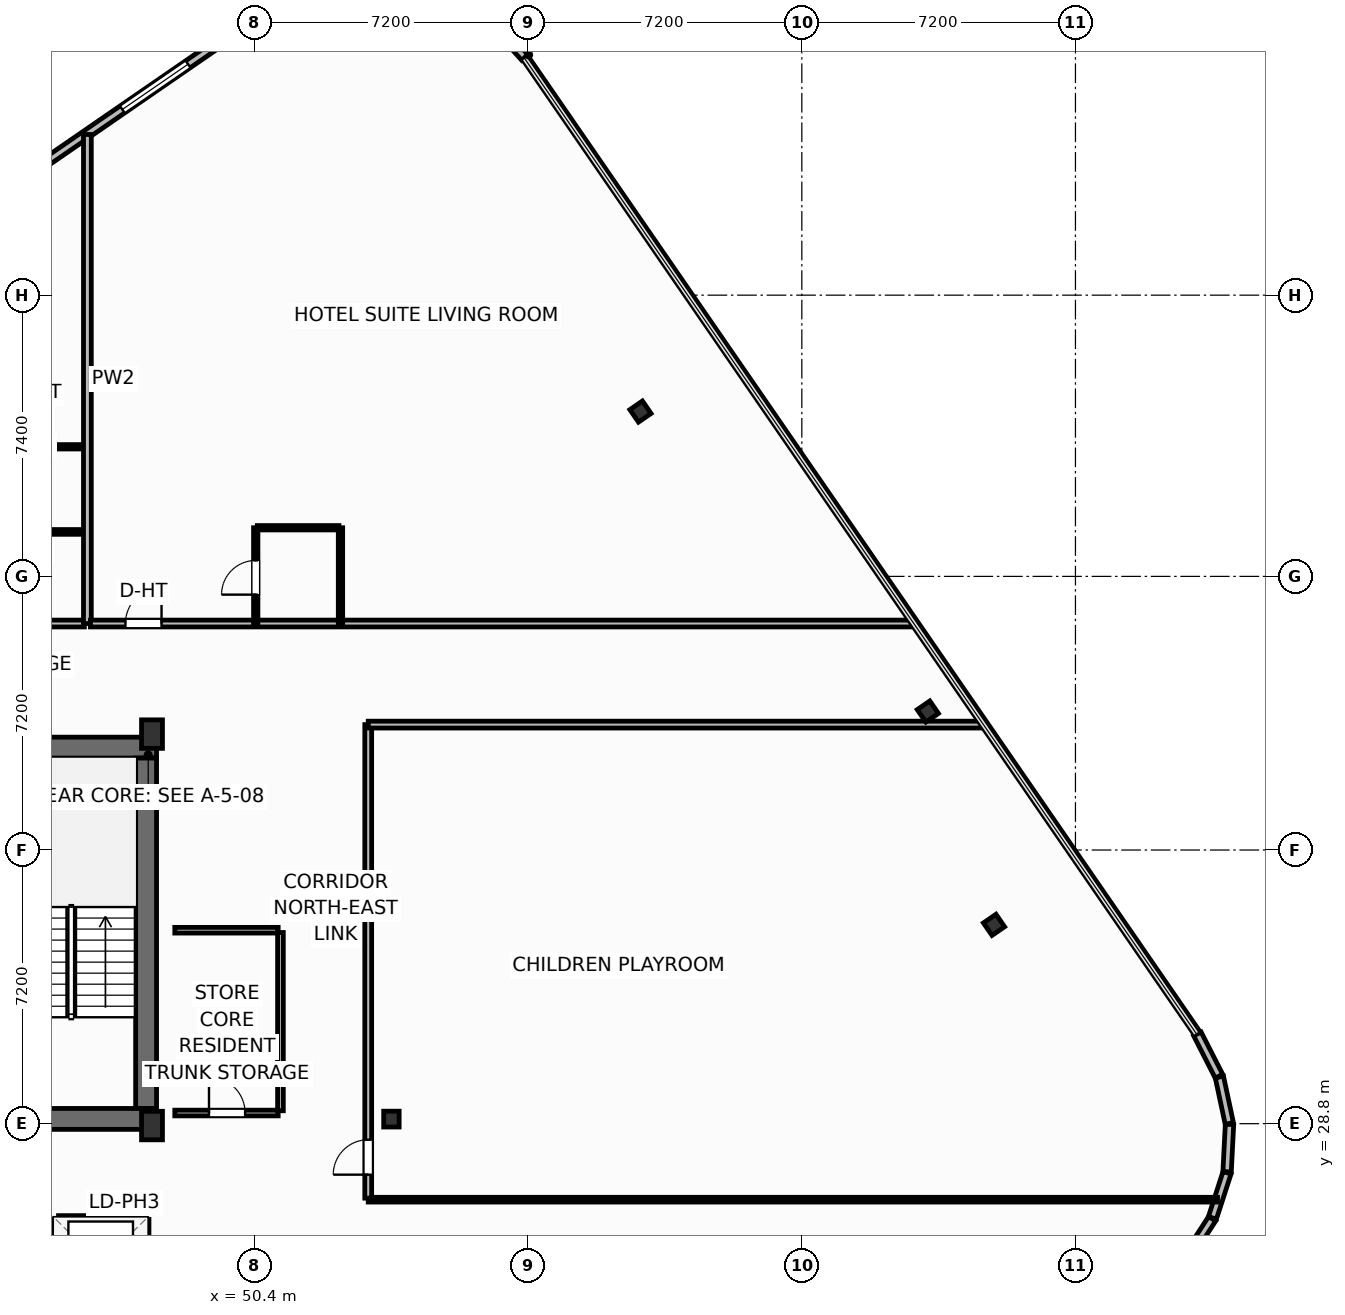
"""IFC4 building model, lengths in metres.
Left out: names, types, materials, properties, quantities, classifications, styles, units other than length and angle.
Written with IfcOpenShell. Run it as: python <this file> out.ifc"""

import sys

from ifc_helpers import new_model, si_unit, direction, frame, frame_2d, origin, origin_2d, place, context, subcontext, project, spatial, rectangle, i_section, extrude, element, fill, save


model = new_model("IFC4")
c1 = context("Model", 3, precision=1e-05, world=origin(), true_north=direction((0.0, 1.0)))
c2 = subcontext(c1, "Body", "Model", "MODEL_VIEW")
j1 = project(units=[si_unit("LENGTHUNIT", "METRE"), si_unit("PLANEANGLEUNIT", "RADIAN")], contexts=[c1])
p1 = place(None, origin())
s1 = spatial("IfcSite", under=j1, at=p1, CompositionType="ELEMENT")
p2 = place(p1, origin())
s2 = spatial("IfcBuilding", under=s1, at=p2, CompositionType="ELEMENT")
p3 = place(p2, frame((0.0, 0.0, 276.7)))
s3 = spatial("IfcBuildingStorey", under=s2, at=p3, CompositionType="ELEMENT", Elevation=276.7)
for number, where, z_axis, x_axis in (
    (1, (47.7, 28.75, 0.0), (0.0, 0.0, 1.0), (1.0, 0.0, 0.0)),
    (2, (47.7, 39.05, 0.0), (0.0, 0.0, 1.0), (1.0, 0.0, 0.0)),
):
    element("IfcColumn", number, at=place(p3, frame(where, z_axis=z_axis, x_axis=x_axis)), inside=s3, PredefinedType="COLUMN", context=c2, shape_type="SweptSolid", body=[
        extrude(rectangle(XDim=0.55, YDim=0.75, at=origin_2d()), origin(), (0.0, 0.0, 1.0), 3.7),
    ])
p4 = place(p3, frame((54.0, 28.92, 0.0), z_axis=(0.0, 0.0, 1.0), x_axis=(1.0, 0.0, 0.0)))
e3 = element("IfcColumn", 3, at=p4, inside=s3, PredefinedType="COLUMN", context=c2, shape_type="SweptSolid", body=[
    extrude(i_section(OverallWidth=0.406, OverallDepth=0.416, WebThickness=0.03, FlangeThickness=0.048, FilletRadius=0.025, at=origin_2d()), origin(), (0.0, 0.0, 1.0), 3.7),
])
p5 = place(p3, frame((30.58, 38.695, 0.0), z_axis=(0.0, 0.0, 1.0), x_axis=(1.0, 0.0, 0.0)))
e4 = element("IfcWall", 4, at=p5, inside=s3, PredefinedType="SHEAR", context=c2, shape_type="SweptSolid", body=[
    extrude(rectangle(XDim=17.24, YDim=0.55, at=frame_2d((8.62, 0.0))), origin(), (0.0, 0.0, 1.0), 3.45),
])
p6 = place(p3, frame((47.545, 29.2, 0.0), z_axis=(0.0, 0.0, 1.0), x_axis=(0.0, 1.0, 0.0)))
e5 = element("IfcWall", 5, at=p6, inside=s3, PredefinedType="SHEAR", context=c2, shape_type="SweptSolid", body=[
    extrude(rectangle(XDim=9.22, YDim=0.55, at=frame_2d((4.61, 0.0))), origin(), (0.0, 0.0, 1.0), 3.45),
])
p7 = place(p3, frame((43.6, 28.925, 0.0), z_axis=(0.0, 0.0, 1.0), x_axis=(1.0, 0.0, 0.0)))
e6 = element("IfcWall", 6, at=p7, inside=s3, PredefinedType="SHEAR", context=c2, shape_type="SweptSolid", body=[
    extrude(rectangle(XDim=4.22, YDim=0.55, at=frame_2d((2.11, 0.0))), origin(), (0.0, 0.0, 1.0), 3.45),
])
for number, where, z_axis, x_axis in (
    (7, (69.857, 34.031, 0.0), (0.0, 0.0, 1.0), (0.824, 0.567, 0.0)),
    (8, (68.115, 39.644, 0.0), (0.0, 0.0, 1.0), (0.824, 0.567, 0.0)),
    (9, (60.554, 47.537, 0.0), (0.0, 0.0, 1.0), (0.824, 0.567, 0.0)),
):
    element("IfcColumn", number, at=place(p3, frame(where, z_axis=z_axis, x_axis=x_axis)), inside=s3, PredefinedType="COLUMN", context=c2, shape_type="SweptSolid", body=[
        extrude(i_section(OverallWidth=0.401, OverallDepth=0.399, WebThickness=0.025, FlangeThickness=0.04, FilletRadius=0.022, at=origin_2d()), origin(), (0.0, 0.0, 1.0), 3.7),
    ])
p8 = place(p3, frame((74.917, 25.25, 0.0), z_axis=(0.0, 0.0, 1.0), x_axis=(0.543778157277, 0.839229000731, 0.0)))
e10 = element("IfcWall", 10, at=p8, inside=s3, PredefinedType="SOLIDWALL", context=c2, shape_type="SweptSolid", body=[
    extrude(rectangle(XDim=1.249, YDim=0.22, at=frame_2d((0.624, 0.0))), origin(), (0.0, 0.0, 1.0), 2.73),
])
for number, where, z_axis, x_axis in (
    (11, (75.604, 26.321, 0.0), (0.0, 0.0, 1.0), (0.308, 0.951, 0.0)),
    (12, (75.99, 27.534, 0.0), (0.0, 0.0, 1.0), (0.051, 0.999, 0.0)),
    (13, (76.049, 28.805, 0.0), (0.0, 0.0, 1.0), (-0.209, 0.978, 0.0)),
    (14, (75.777, 30.049, 0.0), (0.0, 0.0, 1.0), (-0.455, 0.891, 0.0)),
):
    element("IfcWall", number, at=place(p3, frame(where, z_axis=z_axis, x_axis=x_axis)), inside=s3, PredefinedType="SOLIDWALL", context=c2, shape_type="SweptSolid", body=[
        extrude(rectangle(XDim=1.249, YDim=0.22, at=frame_2d((0.625, 0.0))), origin(), (0.0, 0.0, 1.0), 2.73),
    ])
p9 = place(p3, frame((57.51, 56.855, 0.0), z_axis=(0.0, 0.0, 1.0), x_axis=(-0.669853727156, 0.742493086982, 0.0)))
e15 = element("IfcWall", 15, at=p9, inside=s3, PredefinedType="SOLIDWALL", context=c2, shape_type="SweptSolid", body=[
    extrude(rectangle(XDim=1.274, YDim=0.22, at=frame_2d((0.637, 0.0))), origin(), (0.0, 0.0, 1.0), 2.73),
])
p10 = place(p3, frame((50.697, 58.087, 0.0), z_axis=(0.0, 0.0, 1.0), x_axis=(-0.823539455464, -0.567258993137, 0.0)))
e16 = element("IfcWall", 16, at=p10, inside=s3, PredefinedType="SOLIDWALL", context=c2, shape_type="SweptSolid", body=[
    extrude(rectangle(XDim=10.98, YDim=0.22, at=frame_2d((5.49, 0.0))), origin(), (0.0, 0.0, 1.0), 2.73),
])
p11 = place(p10, frame((2.486, 0.0, 0.8)))
e17 = element("IfcOpeningElement", 17, at=p11, cuts=e16, PredefinedType="OPENING", context=c2, shape_type="SweptSolid", body=[
    extrude(rectangle(XDim=2.1, YDim=1.75, at=frame_2d((1.05, 0.875))), frame((0.0, 0.12, 0.0), z_axis=(0.0, -1.0, 0.0), x_axis=(1.0, 0.0, 0.0)), (0.0, 0.0, 1.0), 0.24),
])
p12 = place(p3, frame((33.08, 41.96, 0.0), z_axis=(0.0, 0.0, 1.0), x_axis=(1.0, 0.0, 0.0)))
e18 = element("IfcWall", 18, at=p12, inside=s3, PredefinedType="PARTITIONING", context=c2, shape_type="SweptSolid", body=[
    extrude(rectangle(XDim=12.84, YDim=0.18, at=frame_2d((6.42, 0.0))), origin(), (0.0, 0.0, 1.0), 3.45),
])
p13 = place(p12, frame((3.485, 0.0, 0.0)))
e19 = element("IfcOpeningElement", 19, at=p13, cuts=e18, PredefinedType="OPENING", context=c2, shape_type="SweptSolid", body=[
    extrude(rectangle(XDim=1.0, YDim=2.2, at=frame_2d((0.5, 1.1))), frame((0.0, 0.1, 0.0), z_axis=(0.0, -1.0, 0.0), x_axis=(1.0, 0.0, 0.0)), (0.0, 0.0, 1.0), 0.2),
])
p14 = place(p3, frame((41.19, 44.37, 0.0), z_axis=(0.0, 0.0, 1.0), x_axis=(1.0, 0.0, 0.0)))
e20 = element("IfcWall", 20, at=p14, inside=s3, PredefinedType="PARTITIONING", context=c2, shape_type="SweptSolid", body=[
    extrude(rectangle(XDim=4.73, YDim=0.125, at=frame_2d((2.365, 0.0))), origin(), (0.0, 0.0, 1.0), 3.45),
])
p15 = place(p3, frame((41.19, 46.61, 0.0), z_axis=(0.0, 0.0, 1.0), x_axis=(1.0, 0.0, 0.0)))
e21 = element("IfcWall", 21, at=p15, inside=s3, PredefinedType="PARTITIONING", context=c2, shape_type="SweptSolid", body=[
    extrude(rectangle(XDim=4.73, YDim=0.115, at=frame_2d((2.365, 0.0))), origin(), (0.0, 0.0, 1.0), 3.45),
])
p16 = place(p3, frame((46.0, 41.96, 0.0), z_axis=(0.0, 0.0, 1.0), x_axis=(0.0, 1.0, 0.0)))
e22 = element("IfcWall", 22, at=p16, inside=s3, PredefinedType="PARTITIONING", context=c2, shape_type="SweptSolid", body=[
    extrude(rectangle(XDim=12.868, YDim=0.205, at=frame_2d((6.434, 0.0))), origin(), (0.0, 0.0, 1.0), 3.45),
])
p17 = place(p3, frame((46.08, 41.96, 0.0), z_axis=(0.0, 0.0, 1.0), x_axis=(1.0, 0.0, 0.0)))
e23 = element("IfcWall", 23, at=p17, inside=s3, PredefinedType="PARTITIONING", context=c2, shape_type="SweptSolid", body=[
    extrude(rectangle(XDim=21.627, YDim=0.18, at=frame_2d((10.813, 0.0))), origin(), (0.0, 0.0, 1.0), 3.45),
])
p18 = place(p17, frame((0.921, 0.0, 0.0)))
e24 = element("IfcOpeningElement", 24, at=p18, cuts=e23, PredefinedType="OPENING", context=c2, shape_type="SweptSolid", body=[
    extrude(rectangle(XDim=0.95, YDim=2.15, at=frame_2d((0.475, 1.075))), frame((0.0, 0.1, 0.0), z_axis=(0.0, -1.0, 0.0), x_axis=(1.0, 0.0, 0.0)), (0.0, 0.0, 1.0), 0.2),
])
p19 = place(p3, frame((50.47, 44.48, 0.0), z_axis=(0.0, 0.0, 1.0), x_axis=(1.0, 0.0, 0.0)))
e25 = element("IfcWall", 25, at=p19, inside=s3, PredefinedType="PARTITIONING", context=c2, shape_type="SweptSolid", body=[
    extrude(rectangle(XDim=2.15, YDim=0.115, at=frame_2d((1.075, 0.0))), origin(), (0.0, 0.0, 1.0), 3.45),
])
p20 = place(p3, frame((50.43, 41.96, 0.0), z_axis=(0.0, 0.0, 1.0), x_axis=(0.0, 1.0, 0.0)))
e26 = element("IfcWall", 26, at=p20, inside=s3, PredefinedType="PARTITIONING", context=c2, shape_type="SweptSolid", body=[
    extrude(rectangle(XDim=2.52, YDim=0.115, at=frame_2d((1.26, 0.0))), origin(), (0.0, 0.0, 1.0), 3.45),
])
p21 = place(p20, frame((0.76, 0.0, 0.0)))
e27 = element("IfcOpeningElement", 27, at=p21, cuts=e26, PredefinedType="OPENING", context=c2, shape_type="SweptSolid", body=[
    extrude(rectangle(XDim=0.9, YDim=2.05, at=frame_2d((0.45, 1.025))), frame((0.0, 0.067, 0.0), z_axis=(0.0, -1.0, 0.0), x_axis=(1.0, 0.0, 0.0)), (0.0, 0.0, 1.0), 0.135),
])
p22 = place(p3, frame((52.66, 41.96, 0.0), z_axis=(0.0, 0.0, 1.0), x_axis=(0.0, 1.0, 0.0)))
e28 = element("IfcWall", 28, at=p22, inside=s3, PredefinedType="PARTITIONING", context=c2, shape_type="SweptSolid", body=[
    extrude(rectangle(XDim=2.52, YDim=0.115, at=frame_2d((1.26, 0.0))), origin(), (0.0, 0.0, 1.0), 3.45),
])
p23 = place(p3, frame((53.39, 26.8, 0.0), z_axis=(0.0, 0.0, 1.0), x_axis=(1.0, 0.0, 0.0)))
e29 = element("IfcWall", 29, at=p23, inside=s3, PredefinedType="PARTITIONING", context=c2, shape_type="SweptSolid", body=[
    extrude(rectangle(XDim=22.348, YDim=0.125, at=frame_2d((11.174, 0.0))), origin(), (0.0, 0.0, 1.0), 3.45),
])
p24 = place(p3, frame((53.39, 26.84, 0.0), z_axis=(0.0, 0.0, 1.0), x_axis=(0.0, 1.0, 0.0)))
e30 = element("IfcWall", 30, at=p24, inside=s3, PredefinedType="PARTITIONING", context=c2, shape_type="SweptSolid", body=[
    extrude(rectangle(XDim=12.46, YDim=0.18, at=frame_2d((6.23, 0.0))), origin(), (0.0, 0.0, 1.0), 3.45),
])
p25 = place(p24, frame((0.618, 0.0, 0.0)))
e31 = element("IfcOpeningElement", 31, at=p25, cuts=e30, PredefinedType="OPENING", context=c2, shape_type="SweptSolid", body=[
    extrude(rectangle(XDim=0.92, YDim=2.05, at=frame_2d((0.46, 1.025))), frame((0.0, 0.1, 0.0), z_axis=(0.0, -1.0, 0.0), x_axis=(1.0, 0.0, 0.0)), (0.0, 0.0, 1.0), 0.2),
])
p26 = place(p3, frame((53.39, 39.3, 0.0), z_axis=(0.0, 0.0, 1.0), x_axis=(1.0, 0.0, 0.0)))
e32 = element("IfcWall", 32, at=p26, inside=s3, PredefinedType="PARTITIONING", context=c2, shape_type="SweptSolid", body=[
    extrude(rectangle(XDim=16.149, YDim=0.18, at=frame_2d((8.075, 0.0))), origin(), (0.0, 0.0, 1.0), 2.739),
])
p27 = place(p3, frame((48.3, 29.08, 0.0), z_axis=(0.0, 0.0, 1.0), x_axis=(1.0, 0.0, 0.0)))
e33 = element("IfcWall", 33, at=p27, inside=s3, PredefinedType="PARTITIONING", context=c2, shape_type="SweptSolid", body=[
    extrude(rectangle(XDim=2.72, YDim=0.15, at=frame_2d((1.36, 0.0))), origin(), (0.0, 0.0, 1.0), 2.662),
])
p28 = place(p27, frame((0.9, 0.0, 0.0)))
e34 = element("IfcOpeningElement", 34, at=p28, cuts=e33, PredefinedType="OPENING", context=c2, shape_type="SweptSolid", body=[
    extrude(rectangle(XDim=0.95, YDim=2.05, at=frame_2d((0.475, 1.025))), frame((0.0, 0.085, 0.0), z_axis=(0.0, -1.0, 0.0), x_axis=(1.0, 0.0, 0.0)), (0.0, 0.0, 1.0), 0.17),
])
p29 = place(p3, frame((48.3, 33.89, 0.0), z_axis=(0.0, 0.0, 1.0), x_axis=(1.0, 0.0, 0.0)))
e35 = element("IfcWall", 35, at=p29, inside=s3, PredefinedType="PARTITIONING", context=c2, shape_type="SweptSolid", body=[
    extrude(rectangle(XDim=2.72, YDim=0.15, at=frame_2d((1.36, 0.0))), origin(), (0.0, 0.0, 1.0), 3.45),
])
p30 = place(p3, frame((51.08, 29.14, 0.0), z_axis=(0.0, 0.0, 1.0), x_axis=(0.0, 1.0, 0.0)))
e36 = element("IfcWall", 36, at=p30, inside=s3, PredefinedType="PARTITIONING", context=c2, shape_type="SweptSolid", body=[
    extrude(rectangle(XDim=4.69, YDim=0.15, at=frame_2d((2.345, 0.0))), origin(), (0.0, 0.0, 1.0), 3.45),
])
p31 = place(p3, frame((45.24, 26.28, 0.0), z_axis=(0.0, 0.0, 1.0), x_axis=(1.0, 0.0, 0.0)))
e37 = element("IfcWall", 37, at=p31, inside=s3, PredefinedType="PARTITIONING", context=c2, shape_type="SweptSolid", body=[
    extrude(rectangle(XDim=2.22, YDim=0.2, at=frame_2d((1.11, 0.0))), origin(), (0.0, 0.0, 1.0), 3.45),
])
p32 = place(p3, frame((45.18, 19.38, 0.0), z_axis=(0.0, 0.0, 1.0), x_axis=(0.0, 1.0, 0.0)))
e38 = element("IfcWall", 38, at=p32, inside=s3, PredefinedType="PARTITIONING", context=c2, shape_type="SweptSolid", body=[
    extrude(rectangle(XDim=6.9, YDim=0.2, at=frame_2d((3.45, 0.0))), origin(), (0.0, 0.0, 1.0), 3.45),
])
p33 = place(p3, frame((47.52, 19.38, 0.0), z_axis=(0.0, 0.0, 1.0), x_axis=(0.0, 1.0, 0.0)))
e39 = element("IfcWall", 39, at=p33, inside=s3, PredefinedType="PARTITIONING", context=c2, shape_type="SweptSolid", body=[
    extrude(rectangle(XDim=6.9, YDim=0.2, at=frame_2d((3.45, 0.0))), origin(), (0.0, 0.0, 1.0), 3.45),
])
p34 = place(p33, frame((0.59, 0.0, 0.0)))
e40 = element("IfcOpeningElement", 40, at=p34, cuts=e39, PredefinedType="OPENING", context=c2, shape_type="SweptSolid", body=[
    extrude(rectangle(XDim=1.1, YDim=2.15, at=frame_2d((0.55, 1.075))), frame((0.0, 0.11, 0.0), z_axis=(0.0, -1.0, 0.0), x_axis=(1.0, 0.0, 0.0)), (0.0, 0.0, 1.0), 0.22),
])
p35 = place(p33, frame((2.89, 0.0, 0.0)))
e41 = element("IfcOpeningElement", 41, at=p35, cuts=e39, PredefinedType="OPENING", context=c2, shape_type="SweptSolid", body=[
    extrude(rectangle(XDim=1.1, YDim=2.15, at=frame_2d((0.55, 1.075))), frame((0.0, 0.11, 0.0), z_axis=(0.0, -1.0, 0.0), x_axis=(1.0, 0.0, 0.0)), (0.0, 0.0, 1.0), 0.22),
])
p36 = place(p33, frame((5.19, 0.0, 0.0)))
e42 = element("IfcOpeningElement", 42, at=p36, cuts=e39, PredefinedType="OPENING", context=c2, shape_type="SweptSolid", body=[
    extrude(rectangle(XDim=1.1, YDim=2.15, at=frame_2d((0.55, 1.075))), frame((0.0, 0.11, 0.0), z_axis=(0.0, -1.0, 0.0), x_axis=(1.0, 0.0, 0.0)), (0.0, 0.0, 1.0), 0.22),
])
p37 = place(p11, origin())
e43 = element("IfcWindow", 43, at=p37, inside=s3, PartitioningType="SINGLE_PANEL", PredefinedType="WINDOW", context=c2, shape_type="SweptSolid", body=[
    extrude(rectangle(XDim=2.1, YDim=1.75, at=frame_2d((1.05, 0.875))), frame((0.0, 0.03, 0.0), z_axis=(0.0, -1.0, 0.0), x_axis=(1.0, 0.0, 0.0)), (0.0, 0.0, 1.0), 0.06),
])
fill(e17, e43)
p38 = place(p18, origin())
e44 = element("IfcDoor", 44, at=p38, inside=s3, OperationType="SINGLE_SWING_RIGHT", PredefinedType="DOOR", context=c2, shape_type="SweptSolid", body=[
    extrude(rectangle(XDim=0.95, YDim=2.15, at=frame_2d((0.475, 1.075))), frame((0.0, 0.025, 0.0), z_axis=(0.0, -1.0, 0.0), x_axis=(1.0, 0.0, 0.0)), (0.0, 0.0, 1.0), 0.05),
])
fill(e24, e44)
p39 = place(p21, origin())
e45 = element("IfcDoor", 45, at=p39, inside=s3, OperationType="SINGLE_SWING_LEFT", PredefinedType="DOOR", context=c2, shape_type="SweptSolid", body=[
    extrude(rectangle(XDim=0.9, YDim=2.05, at=frame_2d((0.45, 1.025))), frame((0.0, 0.025, 0.0), z_axis=(0.0, -1.0, 0.0), x_axis=(1.0, 0.0, 0.0)), (0.0, 0.0, 1.0), 0.05),
])
fill(e27, e45)
p40 = place(p25, origin())
e46 = element("IfcDoor", 46, at=p40, inside=s3, OperationType="SINGLE_SWING_LEFT", PredefinedType="DOOR", context=c2, shape_type="SweptSolid", body=[
    extrude(rectangle(XDim=0.92, YDim=2.05, at=frame_2d((0.46, 1.025))), frame((0.0, 0.025, 0.0), z_axis=(0.0, -1.0, 0.0), x_axis=(1.0, 0.0, 0.0)), (0.0, 0.0, 1.0), 0.05),
])
fill(e31, e46)
p41 = place(p28, origin())
e47 = element("IfcDoor", 47, at=p41, inside=s3, OperationType="SINGLE_SWING_LEFT", PredefinedType="DOOR", context=c2, shape_type="SweptSolid", body=[
    extrude(rectangle(XDim=0.95, YDim=2.05, at=frame_2d((0.475, 1.025))), frame((0.0, 0.025, 0.0), z_axis=(0.0, -1.0, 0.0), x_axis=(1.0, 0.0, 0.0)), (0.0, 0.0, 1.0), 0.05),
])
fill(e34, e47)
save(model, sys.argv[1])
